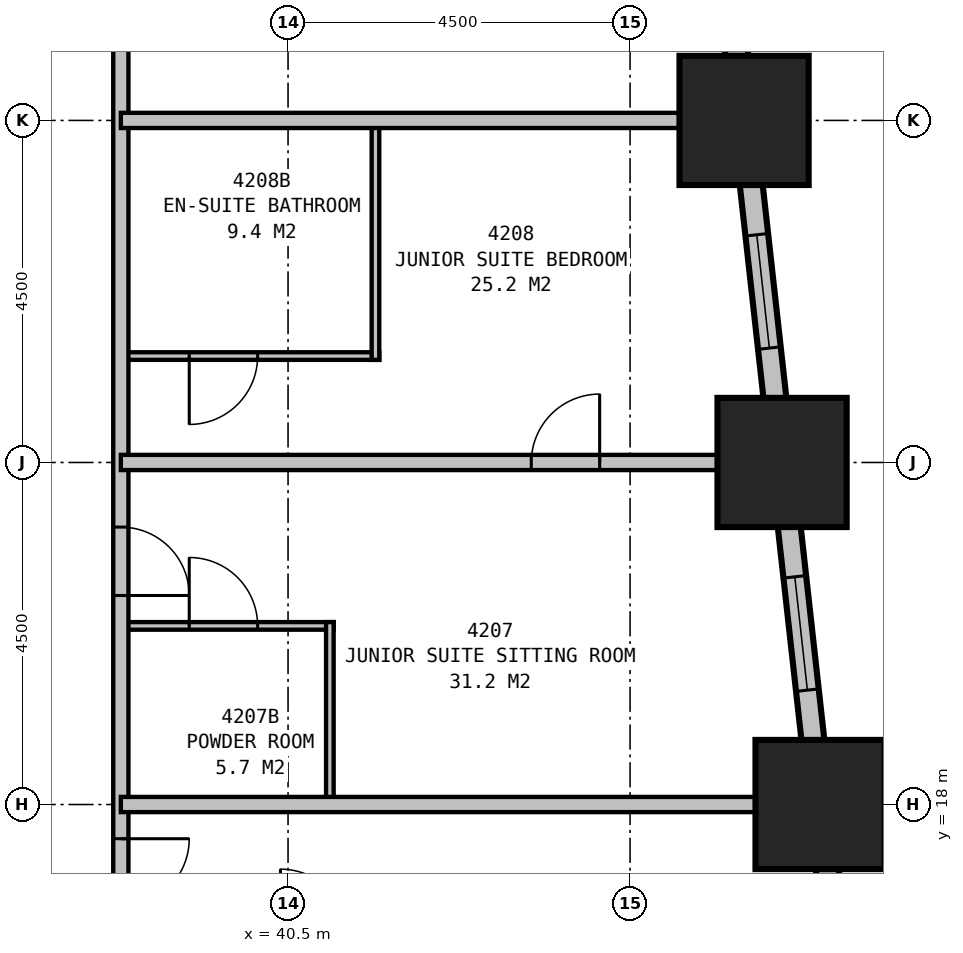
"""IFC4 building model, lengths in metres.
Left out: names, types, materials, properties, quantities, classifications, styles, units other than length and angle.
Written with IfcOpenShell. Run it as: python <this file> out.ifc"""

import sys

from ifc_helpers import new_model, si_unit, direction, frame, frame_2d, origin, origin_2d, place, context, subcontext, project, spatial, rectangle, extrude, element, fill, save


model = new_model("IFC4")
c1 = context("Model", 3, precision=1e-05, world=origin(), true_north=direction((0.0, 1.0)))
c2 = subcontext(c1, "Body", "Model", "MODEL_VIEW")
j1 = project(units=[si_unit("LENGTHUNIT", "METRE"), si_unit("PLANEANGLEUNIT", "RADIAN")], contexts=[c1])
p1 = place(None, origin())
s1 = spatial("IfcSite", under=j1, at=p1, CompositionType="ELEMENT")
p2 = place(p1, origin())
s2 = spatial("IfcBuilding", under=s1, at=p2, CompositionType="ELEMENT")
p3 = place(p2, frame((0.0, 0.0, 165.9)))
s3 = spatial("IfcBuildingStorey", under=s2, at=p3, CompositionType="ELEMENT", Elevation=165.9)
for number, where, z_axis, x_axis in (
    (1, (47.5, 18.0, 0.0), (0.0, 0.0, 1.0), (1.0, 0.0, 0.0)),
    (2, (47.0, 22.5, 0.0), (0.0, 0.0, 1.0), (1.0, 0.0, 0.0)),
    (3, (46.5, 27.0, 0.0), (0.0, 0.0, 1.0), (1.0, 0.0, 0.0)),
):
    element("IfcColumn", number, at=place(p3, frame(where, z_axis=z_axis, x_axis=x_axis)), inside=s3, PredefinedType="COLUMN", context=c2, shape_type="SweptSolid", body=[
        extrude(rectangle(XDim=1.7, YDim=1.7, at=origin_2d()), origin(), (0.0, 0.0, 1.0), 3.5),
    ])
p4 = place(p3, frame((49.017, 4.351, 0.0), z_axis=(0.0, 0.0, 1.0), x_axis=(-0.110433201132, 0.993883548555, 0.0)))
e4 = element("IfcWall", 4, at=p4, inside=s3, PredefinedType="STANDARD", context=c2, shape_type="SweptSolid", body=[
    extrude(rectangle(XDim=31.994, YDim=0.3, at=frame_2d((15.997, 0.0))), origin(), (0.0, 0.0, 1.0), 2.25),
])
p5 = place(p4, frame((1.664, 0.0, 0.5)))
e5 = element("IfcOpeningElement", 5, at=p5, cuts=e4, PredefinedType="OPENING", context=c2, shape_type="SweptSolid", body=[
    extrude(rectangle(XDim=1.5, YDim=1.6, at=frame_2d((0.75, 0.8))), frame((0.0, 0.16, 0.0), z_axis=(0.0, -1.0, 0.0), x_axis=(1.0, 0.0, 0.0)), (0.0, 0.0, 1.0), 0.32),
])
p6 = place(p4, frame((6.192, 0.0, 0.5)))
e6 = element("IfcOpeningElement", 6, at=p6, cuts=e4, PredefinedType="OPENING", context=c2, shape_type="SweptSolid", body=[
    extrude(rectangle(XDim=1.5, YDim=1.6, at=frame_2d((0.75, 0.8))), frame((0.0, 0.16, 0.0), z_axis=(0.0, -1.0, 0.0), x_axis=(1.0, 0.0, 0.0)), (0.0, 0.0, 1.0), 0.32),
])
p7 = place(p4, frame((10.719, 0.0, 0.5)))
e7 = element("IfcOpeningElement", 7, at=p7, cuts=e4, PredefinedType="OPENING", context=c2, shape_type="SweptSolid", body=[
    extrude(rectangle(XDim=1.5, YDim=1.6, at=frame_2d((0.75, 0.8))), frame((0.0, 0.16, 0.0), z_axis=(0.0, -1.0, 0.0), x_axis=(1.0, 0.0, 0.0)), (0.0, 0.0, 1.0), 0.32),
])
p8 = place(p4, frame((15.247, 0.0, 0.5)))
e8 = element("IfcOpeningElement", 8, at=p8, cuts=e4, PredefinedType="OPENING", context=c2, shape_type="SweptSolid", body=[
    extrude(rectangle(XDim=1.5, YDim=1.6, at=frame_2d((0.75, 0.8))), frame((0.0, 0.16, 0.0), z_axis=(0.0, -1.0, 0.0), x_axis=(1.0, 0.0, 0.0)), (0.0, 0.0, 1.0), 0.32),
])
p9 = place(p4, frame((19.775, 0.0, 0.5)))
e9 = element("IfcOpeningElement", 9, at=p9, cuts=e4, PredefinedType="OPENING", context=c2, shape_type="SweptSolid", body=[
    extrude(rectangle(XDim=1.5, YDim=1.6, at=frame_2d((0.75, 0.8))), frame((0.0, 0.16, 0.0), z_axis=(0.0, -1.0, 0.0), x_axis=(1.0, 0.0, 0.0)), (0.0, 0.0, 1.0), 0.32),
])
p10 = place(p4, frame((24.302, 0.0, 0.5)))
e10 = element("IfcOpeningElement", 10, at=p10, cuts=e4, PredefinedType="OPENING", context=c2, shape_type="SweptSolid", body=[
    extrude(rectangle(XDim=1.5, YDim=1.6, at=frame_2d((0.75, 0.8))), frame((0.0, 0.16, 0.0), z_axis=(0.0, -1.0, 0.0), x_axis=(1.0, 0.0, 0.0)), (0.0, 0.0, 1.0), 0.32),
])
p11 = place(p4, frame((28.83, 0.0, 0.5)))
e11 = element("IfcOpeningElement", 11, at=p11, cuts=e4, PredefinedType="OPENING", context=c2, shape_type="SweptSolid", body=[
    extrude(rectangle(XDim=1.5, YDim=1.6, at=frame_2d((0.75, 0.8))), frame((0.0, 0.16, 0.0), z_axis=(0.0, -1.0, 0.0), x_axis=(1.0, 0.0, 0.0)), (0.0, 0.0, 1.0), 0.32),
])
p12 = place(p3, frame((38.3, 10.6, 0.0), z_axis=(0.0, 0.0, 1.0), x_axis=(0.0, 1.0, 0.0)))
e12 = element("IfcWall", 12, at=p12, inside=s3, PredefinedType="PARTITIONING", context=c2, shape_type="SweptSolid", body=[
    extrude(rectangle(XDim=18.7, YDim=0.2, at=frame_2d((9.35, 0.0))), origin(), (0.0, 0.0, 1.0), 3.25),
])
p13 = place(p12, frame((6.95, 0.0, 0.0), z_axis=(0.0, 0.0, 1.0), x_axis=(-1.0, 0.0, 0.0)))
e13 = element("IfcOpeningElement", 13, at=p13, cuts=e12, PredefinedType="OPENING", context=c2, shape_type="SweptSolid", body=[
    extrude(rectangle(XDim=0.9, YDim=2.1, at=frame_2d((0.45, 1.05))), frame((0.0, 0.11, 0.0), z_axis=(0.0, -1.0, 0.0), x_axis=(1.0, 0.0, 0.0)), (0.0, 0.0, 1.0), 0.22),
])
p14 = place(p12, frame((11.05, 0.0, 0.0), z_axis=(0.0, 0.0, 1.0), x_axis=(-1.0, 0.0, 0.0)))
e14 = element("IfcOpeningElement", 14, at=p14, cuts=e12, PredefinedType="OPENING", context=c2, shape_type="SweptSolid", body=[
    extrude(rectangle(XDim=0.9, YDim=2.1, at=frame_2d((0.45, 1.05))), frame((0.0, 0.11, 0.0), z_axis=(0.0, -1.0, 0.0), x_axis=(1.0, 0.0, 0.0)), (0.0, 0.0, 1.0), 0.22),
])
p15 = place(p3, frame((38.3, 18.0, 0.0), z_axis=(0.0, 0.0, 1.0), x_axis=(1.0, 0.0, 0.0)))
e15 = element("IfcWall", 15, at=p15, inside=s3, PredefinedType="PARTITIONING", context=c2, shape_type="SweptSolid", body=[
    extrude(rectangle(XDim=9.199, YDim=0.2, at=frame_2d((4.6, 0.0))), origin(), (0.0, 0.0, 1.0), 2.25),
])
p16 = place(p3, frame((38.3, 22.5, 0.0), z_axis=(0.0, 0.0, 1.0), x_axis=(1.0, 0.0, 0.0)))
e16 = element("IfcWall", 16, at=p16, inside=s3, PredefinedType="PARTITIONING", context=c2, shape_type="SweptSolid", body=[
    extrude(rectangle(XDim=8.699, YDim=0.2, at=frame_2d((4.35, 0.0))), origin(), (0.0, 0.0, 1.0), 2.25),
])
p17 = place(p16, frame((5.4, 0.0, 0.0)))
e17 = element("IfcOpeningElement", 17, at=p17, cuts=e16, PredefinedType="OPENING", context=c2, shape_type="SweptSolid", body=[
    extrude(rectangle(XDim=0.9, YDim=2.1, at=frame_2d((0.45, 1.05))), frame((0.0, 0.11, 0.0), z_axis=(0.0, -1.0, 0.0), x_axis=(1.0, 0.0, 0.0)), (0.0, 0.0, 1.0), 0.22),
])
p18 = place(p3, frame((41.05, 18.0, 0.0), z_axis=(0.0, 0.0, 1.0), x_axis=(0.0, 1.0, 0.0)))
e18 = element("IfcWall", 18, at=p18, inside=s3, PredefinedType="PLUMBINGWALL", context=c2, shape_type="SweptSolid", body=[
    extrude(rectangle(XDim=2.4, YDim=0.1, at=frame_2d((1.2, 0.0))), origin(), (0.0, 0.0, 1.0), 3.25),
])
p19 = place(p3, frame((38.3, 20.35, 0.0), z_axis=(0.0, 0.0, 1.0), x_axis=(1.0, 0.0, 0.0)))
e19 = element("IfcWall", 19, at=p19, inside=s3, PredefinedType="PLUMBINGWALL", context=c2, shape_type="SweptSolid", body=[
    extrude(rectangle(XDim=2.8, YDim=0.1, at=frame_2d((1.4, 0.0))), origin(), (0.0, 0.0, 1.0), 3.25),
])
p20 = place(p19, frame((0.9, 0.0, 0.0)))
e20 = element("IfcOpeningElement", 20, at=p20, cuts=e19, PredefinedType="OPENING", context=c2, shape_type="SweptSolid", body=[
    extrude(rectangle(XDim=0.9, YDim=2.1, at=frame_2d((0.45, 1.05))), frame((0.0, 0.06, 0.0), z_axis=(0.0, -1.0, 0.0), x_axis=(1.0, 0.0, 0.0)), (0.0, 0.0, 1.0), 0.12),
])
p21 = place(p3, frame((41.65, 23.85, 0.0), z_axis=(0.0, 0.0, 1.0), x_axis=(0.0, 1.0, 0.0)))
e21 = element("IfcWall", 21, at=p21, inside=s3, PredefinedType="PLUMBINGWALL", context=c2, shape_type="SweptSolid", body=[
    extrude(rectangle(XDim=3.15, YDim=0.1, at=frame_2d((1.575, 0.0))), origin(), (0.0, 0.0, 1.0), 3.25),
])
p22 = place(p3, frame((38.3, 23.9, 0.0), z_axis=(0.0, 0.0, 1.0), x_axis=(1.0, 0.0, 0.0)))
e22 = element("IfcWall", 22, at=p22, inside=s3, PredefinedType="PLUMBINGWALL", context=c2, shape_type="SweptSolid", body=[
    extrude(rectangle(XDim=3.4, YDim=0.1, at=frame_2d((1.7, 0.0))), origin(), (0.0, 0.0, 1.0), 3.25),
])
p23 = place(p22, frame((1.8, 0.0, 0.0), z_axis=(0.0, 0.0, 1.0), x_axis=(-1.0, 0.0, 0.0)))
e23 = element("IfcOpeningElement", 23, at=p23, cuts=e22, PredefinedType="OPENING", context=c2, shape_type="SweptSolid", body=[
    extrude(rectangle(XDim=0.9, YDim=2.1, at=frame_2d((0.45, 1.05))), frame((0.0, 0.06, 0.0), z_axis=(0.0, -1.0, 0.0), x_axis=(1.0, 0.0, 0.0)), (0.0, 0.0, 1.0), 0.12),
])
p24 = place(p3, frame((38.3, 27.0, 0.0), z_axis=(0.0, 0.0, 1.0), x_axis=(1.0, 0.0, 0.0)))
e24 = element("IfcWall", 24, at=p24, inside=s3, PredefinedType="PARTITIONING", context=c2, shape_type="SweptSolid", body=[
    extrude(rectangle(XDim=7.977, YDim=0.2, at=frame_2d((3.988, 0.0))), origin(), (0.0, 0.0, 1.0), 1.95),
])
p25 = place(p8, origin())
e25 = element("IfcWindow", 25, at=p25, inside=s3, PartitioningType="SINGLE_PANEL", PredefinedType="WINDOW", context=c2, shape_type="SweptSolid", body=[
    extrude(rectangle(XDim=1.5, YDim=1.6, at=frame_2d((0.75, 0.8))), frame((0.0, 0.03, 0.0), z_axis=(0.0, -1.0, 0.0), x_axis=(1.0, 0.0, 0.0)), (0.0, 0.0, 1.0), 0.06),
])
fill(e8, e25)
p26 = place(p9, origin())
e26 = element("IfcWindow", 26, at=p26, inside=s3, PartitioningType="SINGLE_PANEL", PredefinedType="WINDOW", context=c2, shape_type="SweptSolid", body=[
    extrude(rectangle(XDim=1.5, YDim=1.6, at=frame_2d((0.75, 0.8))), frame((0.0, 0.03, 0.0), z_axis=(0.0, -1.0, 0.0), x_axis=(1.0, 0.0, 0.0)), (0.0, 0.0, 1.0), 0.06),
])
fill(e9, e26)
p27 = place(p13, origin())
e27 = element("IfcDoor", 27, at=p27, inside=s3, OperationType="SINGLE_SWING_LEFT", PredefinedType="DOOR", context=c2, shape_type="SweptSolid", body=[
    extrude(rectangle(XDim=0.9, YDim=2.1, at=frame_2d((0.45, 1.05))), frame((0.0, 0.025, 0.0), z_axis=(0.0, -1.0, 0.0), x_axis=(1.0, 0.0, 0.0)), (0.0, 0.0, 1.0), 0.05),
])
fill(e13, e27)
p28 = place(p14, origin())
e28 = element("IfcDoor", 28, at=p28, inside=s3, OperationType="SINGLE_SWING_RIGHT", PredefinedType="DOOR", context=c2, shape_type="SweptSolid", body=[
    extrude(rectangle(XDim=0.9, YDim=2.1, at=frame_2d((0.45, 1.05))), frame((0.0, 0.025, 0.0), z_axis=(0.0, -1.0, 0.0), x_axis=(1.0, 0.0, 0.0)), (0.0, 0.0, 1.0), 0.05),
])
fill(e14, e28)
p29 = place(p17, origin())
e29 = element("IfcDoor", 29, at=p29, inside=s3, OperationType="SINGLE_SWING_RIGHT", PredefinedType="DOOR", context=c2, shape_type="SweptSolid", body=[
    extrude(rectangle(XDim=0.9, YDim=2.1, at=frame_2d((0.45, 1.05))), frame((0.0, 0.025, 0.0), z_axis=(0.0, -1.0, 0.0), x_axis=(1.0, 0.0, 0.0)), (0.0, 0.0, 1.0), 0.05),
])
fill(e17, e29)
p30 = place(p20, origin())
e30 = element("IfcDoor", 30, at=p30, inside=s3, OperationType="SINGLE_SWING_LEFT", PredefinedType="DOOR", context=c2, shape_type="SweptSolid", body=[
    extrude(rectangle(XDim=0.9, YDim=2.1, at=frame_2d((0.45, 1.05))), frame((0.0, 0.025, 0.0), z_axis=(0.0, -1.0, 0.0), x_axis=(1.0, 0.0, 0.0)), (0.0, 0.0, 1.0), 0.05),
])
fill(e20, e30)
p31 = place(p23, origin())
e31 = element("IfcDoor", 31, at=p31, inside=s3, OperationType="SINGLE_SWING_RIGHT", PredefinedType="DOOR", context=c2, shape_type="SweptSolid", body=[
    extrude(rectangle(XDim=0.9, YDim=2.1, at=frame_2d((0.45, 1.05))), frame((0.0, 0.025, 0.0), z_axis=(0.0, -1.0, 0.0), x_axis=(1.0, 0.0, 0.0)), (0.0, 0.0, 1.0), 0.05),
])
fill(e23, e31)
save(model, sys.argv[1])
